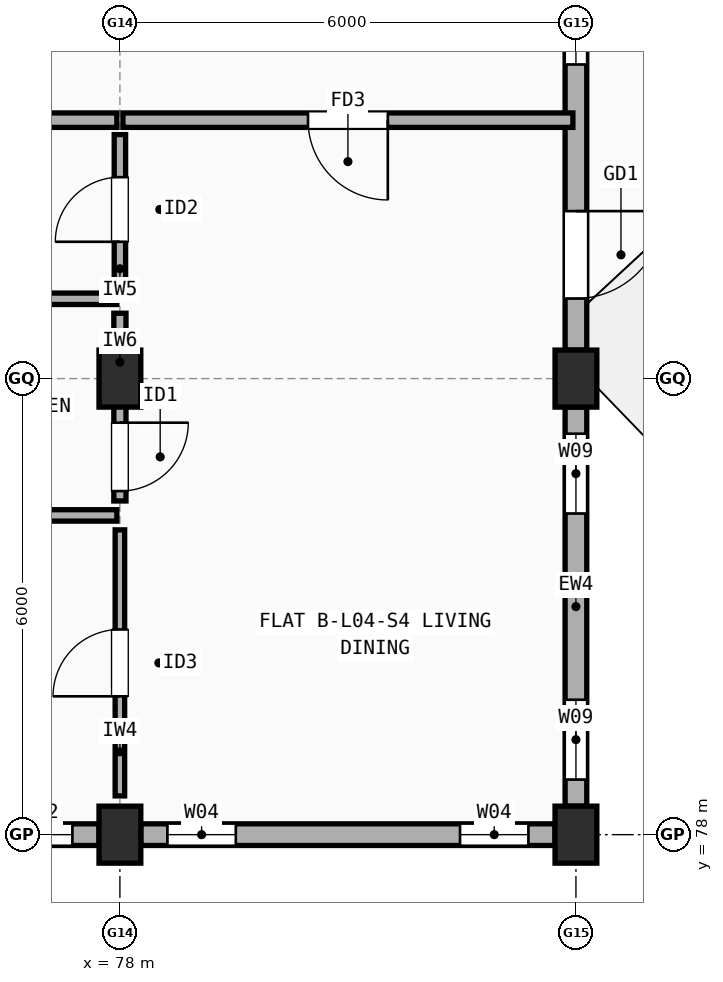
"""IFC4 building model, lengths in metres.
Left out: names, types, materials, properties, quantities, classifications, styles, units other than length and angle.
Written with IfcOpenShell. Run it as: python <this file> out.ifc"""

import sys

from ifc_helpers import new_model, si_unit, direction, frame, frame_2d, origin, origin_2d, place, context, subcontext, project, spatial, rectangle, extrude, element, fill, save


model = new_model("IFC4")
c1 = context("Model", 3, precision=1e-05, world=origin(), true_north=direction((0.0, 1.0)))
c2 = subcontext(c1, "Body", "Model", "MODEL_VIEW")
j1 = project(units=[si_unit("LENGTHUNIT", "METRE"), si_unit("PLANEANGLEUNIT", "RADIAN")], contexts=[c1])
p1 = place(None, origin())
s1 = spatial("IfcSite", under=j1, at=p1, CompositionType="ELEMENT")
p2 = place(p1, origin())
s2 = spatial("IfcBuilding", under=s1, at=p2, CompositionType="ELEMENT")
p3 = place(p2, frame((0.0, 0.0, 14.1)))
s3 = spatial("IfcBuildingStorey", under=s2, at=p3, CompositionType="ELEMENT", Elevation=14.1)
for number, where, z_axis, x_axis in (
    (1, (78.0, 78.0, 0.0), (0.0, 0.0, 1.0), (1.0, 0.0, 0.0)),
    (2, (78.0, 84.0, 0.0), (0.0, 0.0, 1.0), (1.0, 0.0, 0.0)),
    (3, (84.0, 78.0, 0.0), (0.0, 0.0, 1.0), (1.0, 0.0, 0.0)),
    (4, (84.0, 84.0, 0.0), (0.0, 0.0, 1.0), (1.0, 0.0, 0.0)),
):
    element("IfcColumn", number, at=place(p3, frame(where, z_axis=z_axis, x_axis=x_axis)), inside=s3, PredefinedType="COLUMN", context=c2, shape_type="SweptSolid", body=[
        extrude(rectangle(XDim=0.55, YDim=0.75, at=origin_2d()), origin(), (0.0, 0.0, 1.0), 2.95),
    ])
p4 = place(p3, frame((72.325, 78.0, 0.0), z_axis=(0.0, 0.0, 1.0), x_axis=(1.0, 0.0, 0.0)))
e5 = element("IfcWall", 5, at=p4, inside=s3, PredefinedType="STANDARD", context=c2, shape_type="SweptSolid", body=[
    extrude(rectangle(XDim=5.4, YDim=0.285, at=frame_2d((2.7, 0.0))), origin(), (0.0, 0.0, 1.0), 2.432),
])
p5 = place(p4, frame((1.565, 0.0, 0.9)))
e6 = element("IfcOpeningElement", 6, at=p5, cuts=e5, PredefinedType="OPENING", context=c2, shape_type="SweptSolid", body=[
    extrude(rectangle(XDim=0.8, YDim=1.2, at=frame_2d((0.4, 0.6))), frame((0.0, 0.152, 0.0), z_axis=(0.0, -1.0, 0.0), x_axis=(1.0, 0.0, 0.0)), (0.0, 0.0, 1.0), 0.305),
])
p6 = place(p4, frame((4.25, 0.0, 0.9)))
e7 = element("IfcOpeningElement", 7, at=p6, cuts=e5, PredefinedType="OPENING", context=c2, shape_type="SweptSolid", body=[
    extrude(rectangle(XDim=0.8, YDim=1.2, at=frame_2d((0.4, 0.6))), frame((0.0, 0.152, 0.0), z_axis=(0.0, -1.0, 0.0), x_axis=(1.0, 0.0, 0.0)), (0.0, 0.0, 1.0), 0.305),
])
p7 = place(p3, frame((78.275, 78.0, 0.0), z_axis=(0.0, 0.0, 1.0), x_axis=(1.0, 0.0, 0.0)))
e8 = element("IfcWall", 8, at=p7, inside=s3, PredefinedType="STANDARD", context=c2, shape_type="SweptSolid", body=[
    extrude(rectangle(XDim=5.45, YDim=0.285, at=frame_2d((2.725, 0.0))), origin(), (0.0, 0.0, 1.0), 2.432),
])
p8 = place(p7, frame((0.35, 0.0, 0.9)))
e9 = element("IfcOpeningElement", 9, at=p8, cuts=e8, PredefinedType="OPENING", context=c2, shape_type="SweptSolid", body=[
    extrude(rectangle(XDim=0.9, YDim=1.3, at=frame_2d((0.45, 0.65))), frame((0.0, 0.152, 0.0), z_axis=(0.0, -1.0, 0.0), x_axis=(1.0, 0.0, 0.0)), (0.0, 0.0, 1.0), 0.305),
])
p9 = place(p7, frame((4.2, 0.0, 0.9)))
e10 = element("IfcOpeningElement", 10, at=p9, cuts=e8, PredefinedType="OPENING", context=c2, shape_type="SweptSolid", body=[
    extrude(rectangle(XDim=0.9, YDim=1.3, at=frame_2d((0.45, 0.65))), frame((0.0, 0.152, 0.0), z_axis=(0.0, -1.0, 0.0), x_axis=(1.0, 0.0, 0.0)), (0.0, 0.0, 1.0), 0.305),
])
p10 = place(p3, frame((84.0, 78.375, 0.0), z_axis=(0.0, 0.0, 1.0), x_axis=(0.0, 1.0, 0.0)))
e11 = element("IfcWall", 11, at=p10, inside=s3, PredefinedType="STANDARD", context=c2, shape_type="SweptSolid", body=[
    extrude(rectangle(XDim=5.25, YDim=0.285, at=frame_2d((2.625, 0.0))), origin(), (0.0, 0.0, 1.0), 2.432),
])
p11 = place(p10, frame((0.35, 0.0, 0.9)))
e12 = element("IfcOpeningElement", 12, at=p11, cuts=e11, PredefinedType="OPENING", context=c2, shape_type="SweptSolid", body=[
    extrude(rectangle(XDim=1.05, YDim=1.35, at=frame_2d((0.525, 0.675))), frame((0.0, 0.152, 0.0), z_axis=(0.0, -1.0, 0.0), x_axis=(1.0, 0.0, 0.0)), (0.0, 0.0, 1.0), 0.305),
])
p12 = place(p10, frame((3.85, 0.0, 0.9)))
e13 = element("IfcOpeningElement", 13, at=p12, cuts=e11, PredefinedType="OPENING", context=c2, shape_type="SweptSolid", body=[
    extrude(rectangle(XDim=1.05, YDim=1.35, at=frame_2d((0.525, 0.675))), frame((0.0, 0.152, 0.0), z_axis=(0.0, -1.0, 0.0), x_axis=(1.0, 0.0, 0.0)), (0.0, 0.0, 1.0), 0.305),
])
p13 = place(p3, frame((84.0, 84.375, 0.0), z_axis=(0.0, 0.0, 1.0), x_axis=(0.0, 1.0, 0.0)))
e14 = element("IfcWall", 14, at=p13, inside=s3, PredefinedType="STANDARD", context=c2, shape_type="SweptSolid", body=[
    extrude(rectangle(XDim=5.25, YDim=0.285, at=frame_2d((2.625, 0.0))), origin(), (0.0, 0.0, 1.0), 2.432),
])
p14 = place(p13, frame((0.678, 0.0, 0.0)))
e15 = element("IfcOpeningElement", 15, at=p14, cuts=e14, PredefinedType="OPENING", context=c2, shape_type="SweptSolid", body=[
    extrude(rectangle(XDim=1.15, YDim=2.15, at=frame_2d((0.575, 1.075))), frame((0.0, 0.152, 0.0), z_axis=(0.0, -1.0, 0.0), x_axis=(1.0, 0.0, 0.0)), (0.0, 0.0, 1.0), 0.305),
])
p15 = place(p13, frame((3.758, 0.0, 0.9)))
e16 = element("IfcOpeningElement", 16, at=p15, cuts=e14, PredefinedType="OPENING", context=c2, shape_type="SweptSolid", body=[
    extrude(rectangle(XDim=0.8, YDim=1.2, at=frame_2d((0.4, 0.6))), frame((0.0, 0.152, 0.0), z_axis=(0.0, -1.0, 0.0), x_axis=(1.0, 0.0, 0.0)), (0.0, 0.0, 1.0), 0.305),
])
p16 = place(p3, frame((73.54, 87.4, 0.0), z_axis=(0.0, 0.0, 1.0), x_axis=(1.0, 0.0, 0.0)))
e17 = element("IfcWall", 17, at=p16, inside=s3, PredefinedType="SOLIDWALL", context=c2, shape_type="SweptSolid", body=[
    extrude(rectangle(XDim=4.42, YDim=0.19, at=frame_2d((2.21, 0.0))), origin(), (0.0, 0.0, 1.0), 2.432),
])
p17 = place(p3, frame((78.04, 87.4, 0.0), z_axis=(0.0, 0.0, 1.0), x_axis=(1.0, 0.0, 0.0)))
e18 = element("IfcWall", 18, at=p17, inside=s3, PredefinedType="SOLIDWALL", context=c2, shape_type="SweptSolid", body=[
    extrude(rectangle(XDim=5.92, YDim=0.19, at=frame_2d((2.96, 0.0))), origin(), (0.0, 0.0, 1.0), 2.432),
])
p18 = place(p17, frame((2.435, 0.0, 0.0)))
e19 = element("IfcOpeningElement", 19, at=p18, cuts=e18, PredefinedType="OPENING", context=c2, shape_type="SweptSolid", body=[
    extrude(rectangle(XDim=1.05, YDim=2.15, at=frame_2d((0.525, 1.075))), frame((0.0, 0.105, 0.0), z_axis=(0.0, -1.0, 0.0), x_axis=(1.0, 0.0, 0.0)), (0.0, 0.0, 1.0), 0.21),
])
p19 = place(p3, frame((78.0, 78.51, 0.0), z_axis=(0.0, 0.0, 1.0), x_axis=(0.0, 1.0, 0.0)))
e20 = element("IfcWall", 20, at=p19, inside=s3, PredefinedType="PARTITIONING", context=c2, shape_type="SweptSolid", body=[
    extrude(rectangle(XDim=3.5, YDim=0.125, at=frame_2d((1.75, 0.0))), origin(), (0.0, 0.0, 1.0), 2.432),
])
p20 = place(p19, frame((1.31, 0.0, 0.0)))
e21 = element("IfcOpeningElement", 21, at=p20, cuts=e20, PredefinedType="OPENING", context=c2, shape_type="SweptSolid", body=[
    extrude(rectangle(XDim=0.88, YDim=2.1, at=frame_2d((0.44, 1.05))), frame((0.0, 0.073, 0.0), z_axis=(0.0, -1.0, 0.0), x_axis=(1.0, 0.0, 0.0)), (0.0, 0.0, 1.0), 0.145),
])
p21 = place(p3, frame((78.0, 82.39, 0.0), z_axis=(0.0, 0.0, 1.0), x_axis=(0.0, 1.0, 0.0)))
e22 = element("IfcWall", 22, at=p21, inside=s3, PredefinedType="PLUMBINGWALL", context=c2, shape_type="SweptSolid", body=[
    extrude(rectangle(XDim=2.47, YDim=0.16, at=frame_2d((1.235, 0.0))), origin(), (0.0, 0.0, 1.0), 2.432),
])
p22 = place(p21, frame((0.13, 0.0, 0.0)))
e23 = element("IfcOpeningElement", 23, at=p22, cuts=e22, PredefinedType="OPENING", context=c2, shape_type="SweptSolid", body=[
    extrude(rectangle(XDim=0.9, YDim=2.1, at=frame_2d((0.45, 1.05))), frame((0.0, 0.09, 0.0), z_axis=(0.0, -1.0, 0.0), x_axis=(1.0, 0.0, 0.0)), (0.0, 0.0, 1.0), 0.18),
])
p23 = place(p3, frame((78.0, 85.24, 0.0), z_axis=(0.0, 0.0, 1.0), x_axis=(0.0, 1.0, 0.0)))
e24 = element("IfcWall", 24, at=p23, inside=s3, PredefinedType="PARTITIONING", context=c2, shape_type="SweptSolid", body=[
    extrude(rectangle(XDim=1.97, YDim=0.15, at=frame_2d((0.985, 0.0))), origin(), (0.0, 0.0, 1.0), 2.432),
])
p24 = place(p23, frame((0.56, 0.0, 0.0)))
e25 = element("IfcOpeningElement", 25, at=p24, cuts=e24, PredefinedType="OPENING", context=c2, shape_type="SweptSolid", body=[
    extrude(rectangle(XDim=0.85, YDim=2.1, at=frame_2d((0.425, 1.05))), frame((0.0, 0.085, 0.0), z_axis=(0.0, -1.0, 0.0), x_axis=(1.0, 0.0, 0.0)), (0.0, 0.0, 1.0), 0.17),
])
for number, where, z_axis, x_axis in (
    (26, (73.54, 82.2, 0.0), (0.0, 0.0, 1.0), (1.0, 0.0, 0.0)),
    (27, (73.54, 85.05, 0.0), (0.0, 0.0, 1.0), (1.0, 0.0, 0.0)),
):
    element("IfcWall", number, at=place(p3, frame(where, z_axis=z_axis, x_axis=x_axis)), inside=s3, PredefinedType="PARTITIONING", context=c2, shape_type="SweptSolid", body=[
        extrude(rectangle(XDim=4.42, YDim=0.15, at=frame_2d((2.21, 0.0))), origin(), (0.0, 0.0, 1.0), 2.432),
    ])
p25 = place(p6, origin())
e28 = element("IfcWindow", 28, at=p25, inside=s3, PartitioningType="SINGLE_PANEL", PredefinedType="WINDOW", context=c2, shape_type="SweptSolid", body=[
    extrude(rectangle(XDim=0.8, YDim=1.2, at=frame_2d((0.4, 0.6))), frame((0.0, 0.03, 0.0), z_axis=(0.0, -1.0, 0.0), x_axis=(1.0, 0.0, 0.0)), (0.0, 0.0, 1.0), 0.06),
])
fill(e7, e28)
p26 = place(p8, origin())
e29 = element("IfcWindow", 29, at=p26, inside=s3, PartitioningType="SINGLE_PANEL", PredefinedType="WINDOW", context=c2, shape_type="SweptSolid", body=[
    extrude(rectangle(XDim=0.9, YDim=1.3, at=frame_2d((0.45, 0.65))), frame((0.0, 0.03, 0.0), z_axis=(0.0, -1.0, 0.0), x_axis=(1.0, 0.0, 0.0)), (0.0, 0.0, 1.0), 0.06),
])
fill(e9, e29)
p27 = place(p9, origin())
e30 = element("IfcWindow", 30, at=p27, inside=s3, PartitioningType="SINGLE_PANEL", PredefinedType="WINDOW", context=c2, shape_type="SweptSolid", body=[
    extrude(rectangle(XDim=0.9, YDim=1.3, at=frame_2d((0.45, 0.65))), frame((0.0, 0.03, 0.0), z_axis=(0.0, -1.0, 0.0), x_axis=(1.0, 0.0, 0.0)), (0.0, 0.0, 1.0), 0.06),
])
fill(e10, e30)
p28 = place(p11, origin())
e31 = element("IfcWindow", 31, at=p28, inside=s3, PartitioningType="SINGLE_PANEL", PredefinedType="WINDOW", context=c2, shape_type="SweptSolid", body=[
    extrude(rectangle(XDim=1.05, YDim=1.35, at=frame_2d((0.525, 0.675))), frame((0.0, 0.03, 0.0), z_axis=(0.0, -1.0, 0.0), x_axis=(1.0, 0.0, 0.0)), (0.0, 0.0, 1.0), 0.06),
])
fill(e12, e31)
p29 = place(p12, origin())
e32 = element("IfcWindow", 32, at=p29, inside=s3, PartitioningType="SINGLE_PANEL", PredefinedType="WINDOW", context=c2, shape_type="SweptSolid", body=[
    extrude(rectangle(XDim=1.05, YDim=1.35, at=frame_2d((0.525, 0.675))), frame((0.0, 0.03, 0.0), z_axis=(0.0, -1.0, 0.0), x_axis=(1.0, 0.0, 0.0)), (0.0, 0.0, 1.0), 0.06),
])
fill(e13, e32)
p30 = place(p14, frame((1.15, 0.0, 0.0), z_axis=(0.0, 0.0, 1.0), x_axis=(-1.0, 0.0, 0.0)))
e33 = element("IfcDoor", 33, at=p30, inside=s3, OperationType="SINGLE_SWING_RIGHT", PredefinedType="DOOR", context=c2, shape_type="SweptSolid", body=[
    extrude(rectangle(XDim=1.15, YDim=2.15, at=frame_2d((0.575, 1.075))), frame((0.0, 0.025, 0.0), z_axis=(0.0, -1.0, 0.0), x_axis=(1.0, 0.0, 0.0)), (0.0, 0.0, 1.0), 0.05),
])
fill(e15, e33)
p31 = place(p15, origin())
e34 = element("IfcWindow", 34, at=p31, inside=s3, PartitioningType="SINGLE_PANEL", PredefinedType="WINDOW", context=c2, shape_type="SweptSolid", body=[
    extrude(rectangle(XDim=0.8, YDim=1.2, at=frame_2d((0.4, 0.6))), frame((0.0, 0.03, 0.0), z_axis=(0.0, -1.0, 0.0), x_axis=(1.0, 0.0, 0.0)), (0.0, 0.0, 1.0), 0.06),
])
fill(e16, e34)
p32 = place(p18, origin())
e35 = element("IfcDoor", 35, at=p32, inside=s3, OperationType="SINGLE_SWING_RIGHT", PredefinedType="DOOR", context=c2, shape_type="SweptSolid", body=[
    extrude(rectangle(XDim=1.05, YDim=2.15, at=frame_2d((0.525, 1.075))), frame((0.0, 0.025, 0.0), z_axis=(0.0, -1.0, 0.0), x_axis=(1.0, 0.0, 0.0)), (0.0, 0.0, 1.0), 0.05),
])
fill(e19, e35)
p33 = place(p20, origin())
e36 = element("IfcDoor", 36, at=p33, inside=s3, OperationType="SINGLE_SWING_LEFT", PredefinedType="DOOR", context=c2, shape_type="SweptSolid", body=[
    extrude(rectangle(XDim=0.88, YDim=2.1, at=frame_2d((0.44, 1.05))), frame((0.0, 0.025, 0.0), z_axis=(0.0, -1.0, 0.0), x_axis=(1.0, 0.0, 0.0)), (0.0, 0.0, 1.0), 0.05),
])
fill(e21, e36)
p34 = place(p22, origin())
e37 = element("IfcDoor", 37, at=p34, inside=s3, OperationType="SINGLE_SWING_RIGHT", PredefinedType="DOOR", context=c2, shape_type="SweptSolid", body=[
    extrude(rectangle(XDim=0.9, YDim=2.1, at=frame_2d((0.45, 1.05))), frame((0.0, 0.025, 0.0), z_axis=(0.0, -1.0, 0.0), x_axis=(1.0, 0.0, 0.0)), (0.0, 0.0, 1.0), 0.05),
])
fill(e23, e37)
p35 = place(p24, origin())
e38 = element("IfcDoor", 38, at=p35, inside=s3, OperationType="SINGLE_SWING_LEFT", PredefinedType="DOOR", context=c2, shape_type="SweptSolid", body=[
    extrude(rectangle(XDim=0.85, YDim=2.1, at=frame_2d((0.425, 1.05))), frame((0.0, 0.025, 0.0), z_axis=(0.0, -1.0, 0.0), x_axis=(1.0, 0.0, 0.0)), (0.0, 0.0, 1.0), 0.05),
])
fill(e25, e38)
save(model, sys.argv[1])
